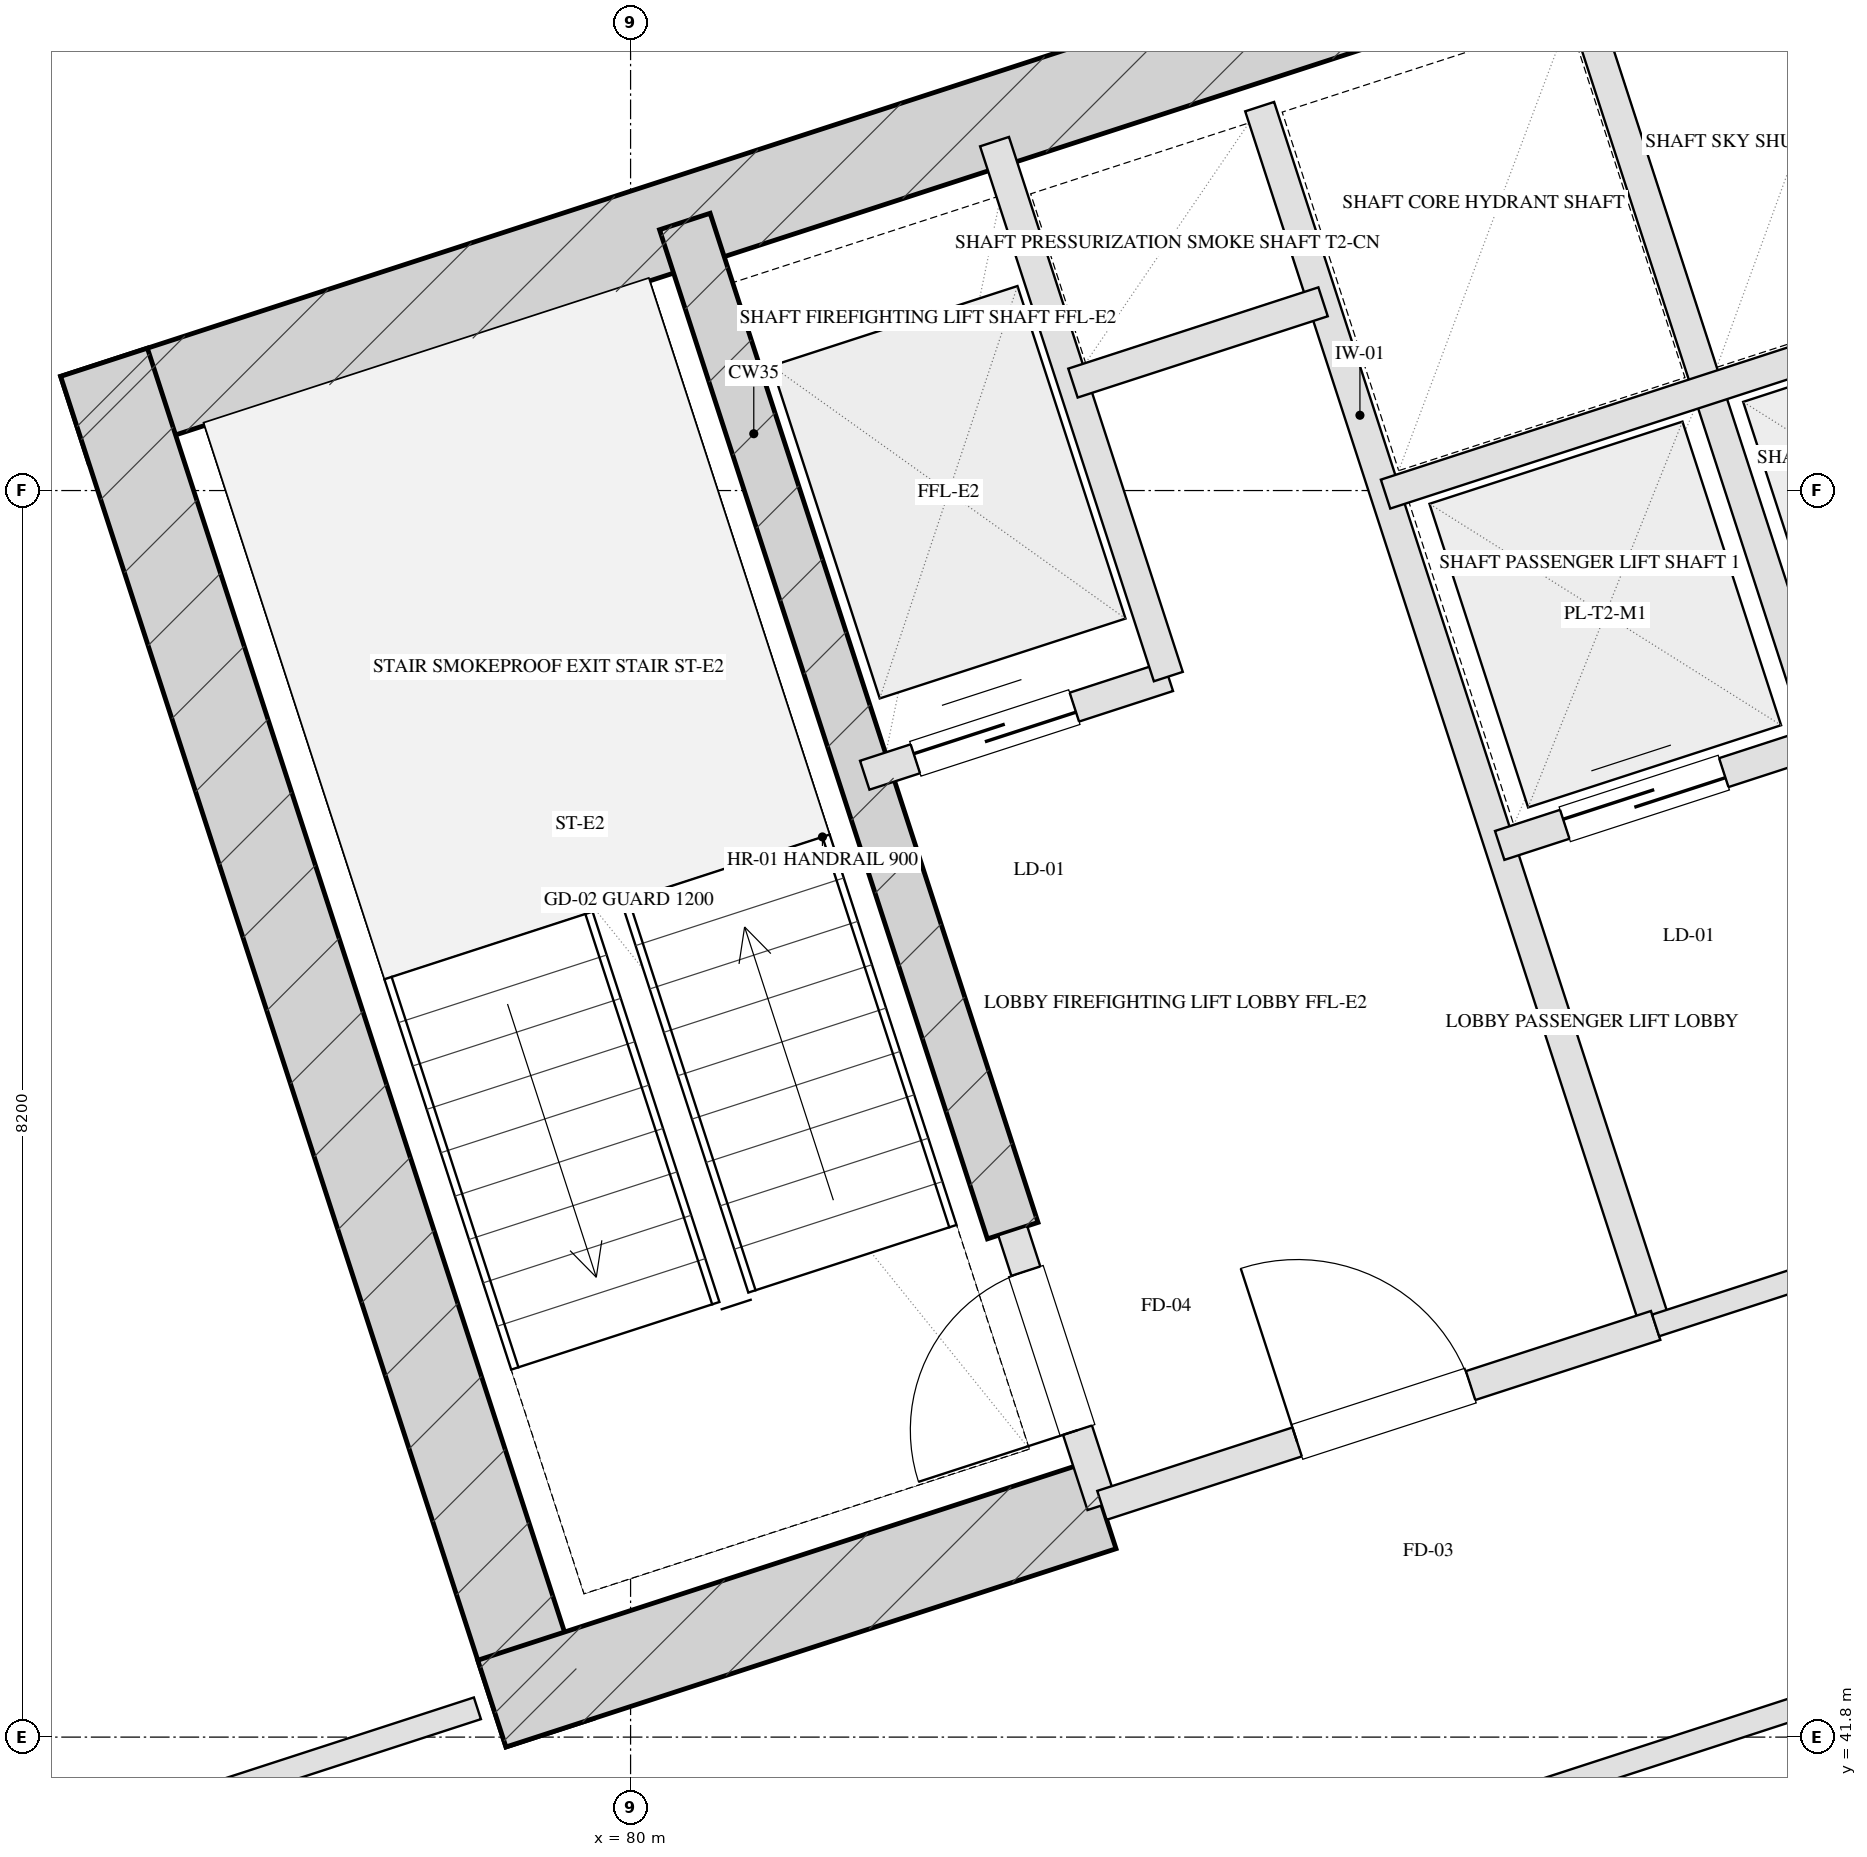
"""IFC4 building model, lengths in metres.
Left out: names, types, materials, properties, quantities, classifications, styles, units other than length and angle.
Written with IfcOpenShell. Run it as: python <this file> out.ifc"""

import sys

from ifc_helpers import new_model, si_unit, direction, frame, frame_2d, origin, place, context, subcontext, project, spatial, rectangle, extrude, element, fill, save


model = new_model("IFC4")
c1 = context("Model", 3, precision=1e-05, world=origin(), true_north=direction((0.0, 1.0)))
c2 = subcontext(c1, "Body", "Model", "MODEL_VIEW")
j1 = project(units=[si_unit("LENGTHUNIT", "METRE"), si_unit("PLANEANGLEUNIT", "RADIAN")], contexts=[c1])
p1 = place(None, origin())
s1 = spatial("IfcSite", under=j1, at=p1, CompositionType="ELEMENT")
p2 = place(p1, origin())
s2 = spatial("IfcBuilding", under=s1, at=p2, CompositionType="ELEMENT")
p3 = place(p2, frame((0.0, 0.0, 96.6)))
s3 = spatial("IfcBuildingStorey", under=s2, at=p3, CompositionType="ELEMENT", Elevation=96.6)
p4 = place(p3, frame((76.344, 50.466, 0.0), z_axis=(0.0, 0.0, 1.0), x_axis=(0.951055727519, 0.309019421968, 0.0)))
e1 = element("IfcWall", 1, at=p4, inside=s3, PredefinedType="SHEAR", context=c2, shape_type="SweptSolid", body=[
    extrude(rectangle(XDim=16.4, YDim=0.6, at=frame_2d((8.2, 0.0))), origin(), (0.0, 0.0, 1.0), 3.45),
])
p5 = place(p3, frame((79.466, 41.828, 0.0), z_axis=(0.0, 0.0, 1.0), x_axis=(-0.309041232772, 0.951048640421, 0.0)))
e2 = element("IfcWall", 2, at=p5, inside=s3, PredefinedType="SHEAR", context=c2, shape_type="SweptSolid", body=[
    extrude(rectangle(XDim=9.48, YDim=0.6, at=frame_2d((4.74, 0.0))), origin(), (0.0, 0.0, 1.0), 3.45),
])
p6 = place(p3, frame((82.514, 45.131, 0.0), z_axis=(0.0, 0.0, 1.0), x_axis=(-0.308988790936, 0.951065679686, 0.0)))
e3 = element("IfcWall", 3, at=p6, inside=s3, PredefinedType="SHEAR", context=c2, shape_type="SweptSolid", body=[
    extrude(rectangle(XDim=6.98, YDim=0.35, at=frame_2d((3.49, 0.0))), origin(), (0.0, 0.0, 1.0), 3.45),
])
p7 = place(p3, frame((79.087, 42.021, 0.0), z_axis=(0.0, 0.0, 1.0), x_axis=(0.951062550203, 0.3089984233, 0.0)))
e4 = element("IfcWall", 4, at=p7, inside=s3, PredefinedType="SHEAR", context=c2, shape_type="SweptSolid", body=[
    extrude(rectangle(XDim=4.22, YDim=0.6, at=frame_2d((2.11, 0.0))), origin(), (0.0, 0.0, 1.0), 3.45),
])
p8 = place(p3, frame((80.716, 6.59, 0.0), z_axis=(0.0, 0.0, 1.0), x_axis=(-0.309017542002, 0.95105633836, 0.0)))
e5 = element("IfcWall", 5, at=p8, inside=s3, PredefinedType="SOLIDWALL", context=c2, shape_type="SweptSolid", body=[
    extrude(rectangle(XDim=46.4, YDim=0.4, at=frame_2d((23.2, 0.0))), origin(), (0.0, 0.0, 1.0), 2.55),
])
p9 = place(p8, frame((15.6, 0.0, 0.75)))
e6 = element("IfcOpeningElement", 6, at=p9, cuts=e5, PredefinedType="OPENING", context=c2, shape_type="SweptSolid", body=[
    extrude(rectangle(XDim=2.4, YDim=1.4, at=frame_2d((1.2, 0.7))), frame((0.0, 0.21, 0.0), z_axis=(0.0, -1.0, 0.0), x_axis=(1.0, 0.0, 0.0)), (0.0, 0.0, 1.0), 0.42),
])
p10 = place(p8, frame((19.4, 0.0, 0.75)))
e7 = element("IfcOpeningElement", 7, at=p10, cuts=e5, PredefinedType="OPENING", context=c2, shape_type="SweptSolid", body=[
    extrude(rectangle(XDim=2.4, YDim=1.4, at=frame_2d((1.2, 0.7))), frame((0.0, 0.21, 0.0), z_axis=(0.0, -1.0, 0.0), x_axis=(1.0, 0.0, 0.0)), (0.0, 0.0, 1.0), 0.42),
])
p11 = place(p8, frame((24.6, 0.0, 0.75)))
e8 = element("IfcOpeningElement", 8, at=p11, cuts=e5, PredefinedType="OPENING", context=c2, shape_type="SweptSolid", body=[
    extrude(rectangle(XDim=2.4, YDim=1.4, at=frame_2d((1.2, 0.7))), frame((0.0, 0.21, 0.0), z_axis=(0.0, -1.0, 0.0), x_axis=(1.0, 0.0, 0.0)), (0.0, 0.0, 1.0), 0.42),
])
p12 = place(p8, frame((28.4, 0.0, 0.75)))
e9 = element("IfcOpeningElement", 9, at=p12, cuts=e5, PredefinedType="OPENING", context=c2, shape_type="SweptSolid", body=[
    extrude(rectangle(XDim=2.4, YDim=1.4, at=frame_2d((1.2, 0.7))), frame((0.0, 0.21, 0.0), z_axis=(0.0, -1.0, 0.0), x_axis=(1.0, 0.0, 0.0)), (0.0, 0.0, 1.0), 0.42),
])
p13 = place(p3, frame((83.101, 43.324, 0.0), z_axis=(0.0, 0.0, 1.0), x_axis=(-0.309048298632, 0.951046344356, 0.0)))
e10 = element("IfcWall", 10, at=p13, inside=s3, PredefinedType="PARTITIONING", context=c2, shape_type="SweptSolid", body=[
    extrude(rectangle(XDim=1.9, YDim=0.2, at=frame_2d((0.95, 0.0))), origin(), (0.0, 0.0, 1.0), 3.155),
])
p14 = place(p13, frame((0.52, 0.0, 0.0)))
e11 = element("IfcOpeningElement", 11, at=p14, cuts=e10, PredefinedType="OPENING", context=c2, shape_type="SweptSolid", body=[
    extrude(rectangle(XDim=1.1, YDim=2.05, at=frame_2d((0.55, 1.025))), frame((0.0, 0.11, 0.0), z_axis=(0.0, -1.0, 0.0), x_axis=(1.0, 0.0, 0.0)), (0.0, 0.0, 1.0), 0.22),
])
p15 = place(p3, frame((86.743, 44.508, 0.0), z_axis=(0.0, 0.0, 1.0), x_axis=(-0.309016001439, 0.951056838919, 0.0)))
e12 = element("IfcWall", 12, at=p15, inside=s3, PredefinedType="PARTITIONING", context=c2, shape_type="SweptSolid", body=[
    extrude(rectangle(XDim=8.43, YDim=0.2, at=frame_2d((4.215, 0.0))), origin(), (0.0, 0.0, 1.0), 3.155),
])
p16 = place(p3, frame((83.101, 43.324, 0.0), z_axis=(0.0, 0.0, 1.0), x_axis=(0.951052804469, 0.309028417967, 0.0)))
e13 = element("IfcWall", 13, at=p16, inside=s3, PredefinedType="PARTITIONING", context=c2, shape_type="SweptSolid", body=[
    extrude(rectangle(XDim=3.83, YDim=0.2, at=frame_2d((1.915, 0.0))), origin(), (0.0, 0.0, 1.0), 3.155),
])
p17 = place(p16, frame((1.35, 0.0, 0.0)))
e14 = element("IfcOpeningElement", 14, at=p17, cuts=e13, PredefinedType="OPENING", context=c2, shape_type="SweptSolid", body=[
    extrude(rectangle(XDim=1.2, YDim=2.05, at=frame_2d((0.6, 1.025))), frame((0.0, 0.11, 0.0), z_axis=(0.0, -1.0, 0.0), x_axis=(1.0, 0.0, 0.0)), (0.0, 0.0, 1.0), 0.22),
])
p18 = place(p3, frame((81.54, 48.127, 0.0), z_axis=(0.0, 0.0, 1.0), x_axis=(0.951062257173, 0.308999325213, 0.0)))
e15 = element("IfcWall", 15, at=p18, inside=s3, PredefinedType="PARTITIONING", context=c2, shape_type="SweptSolid", body=[
    extrude(rectangle(XDim=2.1, YDim=0.2, at=frame_2d((1.05, 0.0))), origin(), (0.0, 0.0, 1.0), 3.155),
])
p19 = place(p18, frame((0.35, 0.0, 0.0)))
e16 = element("IfcOpeningElement", 16, at=p19, cuts=e15, PredefinedType="OPENING", context=c2, shape_type="SweptSolid", body=[
    extrude(rectangle(XDim=1.1, YDim=2.05, at=frame_2d((0.55, 1.025))), frame((0.0, 0.11, 0.0), z_axis=(0.0, -1.0, 0.0), x_axis=(1.0, 0.0, 0.0)), (0.0, 0.0, 1.0), 0.22),
])
p20 = place(p3, frame((83.538, 48.776, 0.0), z_axis=(0.0, 0.0, 1.0), x_axis=(-0.3089935693, 0.951064127245, 0.0)))
e17 = element("IfcWall", 17, at=p20, inside=s3, PredefinedType="PARTITIONING", context=c2, shape_type="SweptSolid", body=[
    extrude(rectangle(XDim=3.7, YDim=0.2, at=frame_2d((1.85, 0.0))), origin(), (0.0, 0.0, 1.0), 3.155),
])
p21 = place(p3, frame((82.91, 50.707, 0.0), z_axis=(0.0, 0.0, 1.0), x_axis=(0.951041328149, 0.309063734775, 0.0)))
e18 = element("IfcWall", 18, at=p21, inside=s3, PredefinedType="PARTITIONING", context=c2, shape_type="SweptSolid", body=[
    extrude(rectangle(XDim=1.73, YDim=0.2, at=frame_2d((0.865, 0.0))), origin(), (0.0, 0.0, 1.0), 3.155),
])
p22 = place(p3, frame((86.743, 44.508, 0.0), z_axis=(0.0, 0.0, 1.0), x_axis=(0.951063829732, 0.308994485023, 0.0)))
e19 = element("IfcWall", 19, at=p22, inside=s3, PredefinedType="PARTITIONING", context=c2, shape_type="SweptSolid", body=[
    extrude(rectangle(XDim=4.4, YDim=0.15, at=frame_2d((2.2, 0.0))), origin(), (0.0, 0.0, 1.0), 3.155),
])
p23 = place(p22, frame((1.45, 0.0, 0.0)))
e20 = element("IfcOpeningElement", 20, at=p23, cuts=e19, PredefinedType="OPENING", context=c2, shape_type="SweptSolid", body=[
    extrude(rectangle(XDim=1.5, YDim=2.05, at=frame_2d((0.75, 1.025))), frame((0.0, 0.085, 0.0), z_axis=(0.0, -1.0, 0.0), x_axis=(1.0, 0.0, 0.0)), (0.0, 0.0, 1.0), 0.17),
])
p24 = place(p3, frame((85.718, 47.666, 0.0), z_axis=(0.0, 0.0, 1.0), x_axis=(0.951058531764, 0.30901079133, 0.0)))
e21 = element("IfcWall", 21, at=p24, inside=s3, PredefinedType="PARTITIONING", context=c2, shape_type="SweptSolid", body=[
    extrude(rectangle(XDim=4.4, YDim=0.2, at=frame_2d((2.2, 0.0))), origin(), (0.0, 0.0, 1.0), 3.155),
])
p25 = place(p24, frame((0.45, 0.0, 0.0)))
e22 = element("IfcOpeningElement", 22, at=p25, cuts=e21, PredefinedType="OPENING", context=c2, shape_type="SweptSolid", body=[
    extrude(rectangle(XDim=1.1, YDim=2.05, at=frame_2d((0.55, 1.025))), frame((0.0, 0.11, 0.0), z_axis=(0.0, -1.0, 0.0), x_axis=(1.0, 0.0, 0.0)), (0.0, 0.0, 1.0), 0.22),
])
p26 = place(p24, frame((2.55, 0.0, 0.0)))
e23 = element("IfcOpeningElement", 23, at=p26, cuts=e21, PredefinedType="OPENING", context=c2, shape_type="SweptSolid", body=[
    extrude(rectangle(XDim=1.1, YDim=2.05, at=frame_2d((0.55, 1.025))), frame((0.0, 0.11, 0.0), z_axis=(0.0, -1.0, 0.0), x_axis=(1.0, 0.0, 0.0)), (0.0, 0.0, 1.0), 0.22),
])
p27 = place(p3, frame((87.838, 48.354, 0.0), z_axis=(0.0, 0.0, 1.0), x_axis=(-0.3090093719, 0.951058992953, 0.0)))
e24 = element("IfcWall", 24, at=p27, inside=s3, PredefinedType="PARTITIONING", context=c2, shape_type="SweptSolid", body=[
    extrude(rectangle(XDim=5.11, YDim=0.2, at=frame_2d((2.555, 0.0))), origin(), (0.0, 0.0, 1.0), 3.155),
])
p28 = place(p3, frame((84.967, 49.977, 0.0), z_axis=(0.0, 0.0, 1.0), x_axis=(0.951063829732, 0.308994485023, 0.0)))
e25 = element("IfcWall", 25, at=p28, inside=s3, PredefinedType="PARTITIONING", context=c2, shape_type="SweptSolid", body=[
    extrude(rectangle(XDim=4.4, YDim=0.2, at=frame_2d((2.2, 0.0))), origin(), (0.0, 0.0, 1.0), 3.155),
])
p29 = place(p3, frame((70.338, 39.177, 0.0), z_axis=(0.0, 0.0, 1.0), x_axis=(0.951059695568, 0.309007209409, 0.0)))
e26 = element("IfcWall", 26, at=p29, inside=s3, PredefinedType="PARTITIONING", context=c2, shape_type="SweptSolid", body=[
    extrude(rectangle(XDim=9.1, YDim=0.15, at=frame_2d((4.55, 0.0))), origin(), (0.0, 0.0, 1.0), 3.155),
])
p30 = place(p29, frame((3.822, 0.0, 0.0)))
e27 = element("IfcOpeningElement", 27, at=p30, cuts=e26, PredefinedType="OPENING", context=c2, shape_type="SweptSolid", body=[
    extrude(rectangle(XDim=1.05, YDim=2.05, at=frame_2d((0.525, 1.025))), frame((0.0, 0.085, 0.0), z_axis=(0.0, -1.0, 0.0), x_axis=(1.0, 0.0, 0.0)), (0.0, 0.0, 1.0), 0.17),
])
p31 = place(p3, frame((80.534, 39.672, 0.0), z_axis=(0.0, 0.0, 1.0), x_axis=(0.951052319652, 0.309029910015, 0.0)))
e28 = element("IfcWall", 28, at=p31, inside=s3, PredefinedType="PARTITIONING", context=c2, shape_type="SweptSolid", body=[
    extrude(rectangle(XDim=8.65, YDim=0.15, at=frame_2d((4.325, 0.0))), origin(), (0.0, 0.0, 1.0), 3.155),
])
p32 = place(p14, origin())
e29 = element("IfcDoor", 29, at=p32, inside=s3, OperationType="SINGLE_SWING_LEFT", PredefinedType="DOOR", context=c2, shape_type="SweptSolid", body=[
    extrude(rectangle(XDim=1.1, YDim=2.05, at=frame_2d((0.55, 1.025))), frame((0.0, 0.025, 0.0), z_axis=(0.0, -1.0, 0.0), x_axis=(1.0, 0.0, 0.0)), (0.0, 0.0, 1.0), 0.05),
])
fill(e11, e29)
p33 = place(p17, origin())
e30 = element("IfcDoor", 30, at=p33, inside=s3, OperationType="SINGLE_SWING_LEFT", PredefinedType="DOOR", context=c2, shape_type="SweptSolid", body=[
    extrude(rectangle(XDim=1.2, YDim=2.05, at=frame_2d((0.6, 1.025))), frame((0.0, 0.025, 0.0), z_axis=(0.0, -1.0, 0.0), x_axis=(1.0, 0.0, 0.0)), (0.0, 0.0, 1.0), 0.05),
])
fill(e14, e30)
p34 = place(p19, origin())
e31 = element("IfcDoor", 31, at=p34, inside=s3, OperationType="DOUBLE_DOOR_SLIDING", PredefinedType="DOOR", context=c2, shape_type="SweptSolid", body=[
    extrude(rectangle(XDim=1.1, YDim=2.05, at=frame_2d((0.55, 1.025))), frame((0.0, 0.025, 0.0), z_axis=(0.0, -1.0, 0.0), x_axis=(1.0, 0.0, 0.0)), (0.0, 0.0, 1.0), 0.05),
])
fill(e16, e31)
p35 = place(p25, origin())
e32 = element("IfcDoor", 32, at=p35, inside=s3, OperationType="DOUBLE_DOOR_SLIDING", PredefinedType="DOOR", context=c2, shape_type="SweptSolid", body=[
    extrude(rectangle(XDim=1.1, YDim=2.05, at=frame_2d((0.55, 1.025))), frame((0.0, 0.025, 0.0), z_axis=(0.0, -1.0, 0.0), x_axis=(1.0, 0.0, 0.0)), (0.0, 0.0, 1.0), 0.05),
])
fill(e22, e32)
save(model, sys.argv[1])
